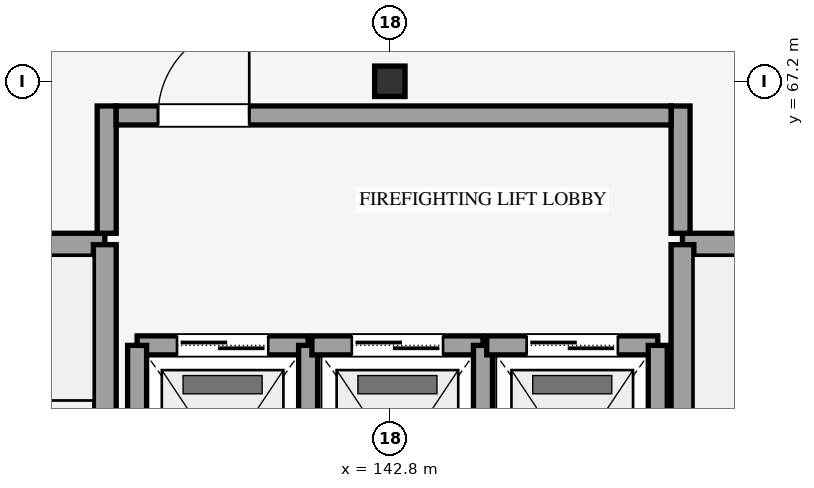
"""IFC4 building model, lengths in metres.
Left out: names, types, materials, properties, quantities, classifications, styles, units other than length and angle.
Written with IfcOpenShell. Run it as: python <this file> out.ifc"""

import sys

from ifc_helpers import new_model, si_unit, direction, frame, frame_2d, origin, origin_2d, place, context, subcontext, project, spatial, rectangle, i_section, extrude, element, fill, save


model = new_model("IFC4")
c1 = context("Model", 3, precision=1e-05, world=origin(), true_north=direction((0.0, 1.0)))
c2 = subcontext(c1, "Body", "Model", "MODEL_VIEW")
j1 = project(units=[si_unit("LENGTHUNIT", "METRE"), si_unit("PLANEANGLEUNIT", "RADIAN")], contexts=[c1])
p1 = place(None, origin())
s1 = spatial("IfcSite", under=j1, at=p1, CompositionType="ELEMENT")
p2 = place(p1, origin())
s2 = spatial("IfcBuilding", under=s1, at=p2, CompositionType="ELEMENT")
p3 = place(p2, frame((0.0, 0.0, 36.3)))
s3 = spatial("IfcBuildingStorey", under=s2, at=p3, CompositionType="ELEMENT", Elevation=36.3)
p4 = place(p3, frame((142.8, 67.2, 0.0), z_axis=(0.0, 0.0, 1.0), x_axis=(1.0, 0.0, 0.0)))
e1 = element("IfcColumn", 1, at=p4, inside=s3, PredefinedType="COLUMN", context=c2, shape_type="SweptSolid", body=[
    extrude(i_section(OverallWidth=0.4, OverallDepth=0.4, WebThickness=0.013, FlangeThickness=0.021, FilletRadius=0.022, at=origin_2d()), origin(), (0.0, 0.0, 1.0), 4.2),
])
p5 = place(p3, frame((135.05, 65.05, 0.0), z_axis=(0.0, 0.0, 1.0), x_axis=(1.0, 0.0, 0.0)))
e2 = element("IfcWall", 2, at=p5, inside=s3, PredefinedType="SHEAR", context=c2, shape_type="SweptSolid", body=[
    extrude(rectangle(XDim=4.0, YDim=0.3, at=frame_2d((2.0, 0.0))), origin(), (0.0, 0.0, 1.0), 4.2),
])
p6 = place(p3, frame((139.05, 50.75, 0.0), z_axis=(0.0, 0.0, 1.0), x_axis=(0.0, 1.0, 0.0)))
e3 = element("IfcWall", 3, at=p6, inside=s3, PredefinedType="SHEAR", context=c2, shape_type="SweptSolid", body=[
    extrude(rectangle(XDim=14.3, YDim=0.3, at=frame_2d((7.15, 0.0))), origin(), (0.0, 0.0, 1.0), 4.2),
])
p7 = place(p3, frame((146.65, 65.05, 0.0), z_axis=(0.0, 0.0, 1.0), x_axis=(1.0, 0.0, 0.0)))
e4 = element("IfcWall", 4, at=p7, inside=s3, PredefinedType="SHEAR", context=c2, shape_type="SweptSolid", body=[
    extrude(rectangle(XDim=4.0, YDim=0.3, at=frame_2d((2.0, 0.0))), origin(), (0.0, 0.0, 1.0), 4.2),
])
p8 = place(p3, frame((146.65, 50.75, 0.0), z_axis=(0.0, 0.0, 1.0), x_axis=(0.0, 1.0, 0.0)))
e5 = element("IfcWall", 5, at=p8, inside=s3, PredefinedType="SHEAR", context=c2, shape_type="SweptSolid", body=[
    extrude(rectangle(XDim=14.3, YDim=0.3, at=frame_2d((7.15, 0.0))), origin(), (0.0, 0.0, 1.0), 4.2),
])
p9 = place(p3, frame((139.475, 63.725, 0.0), z_axis=(0.0, 0.0, 1.0), x_axis=(1.0, 0.0, 0.0)))
e6 = element("IfcWall", 6, at=p9, inside=s3, PredefinedType="SHEAR", context=c2, shape_type="SweptSolid", body=[
    extrude(rectangle(XDim=2.25, YDim=0.25, at=frame_2d((1.125, 0.0))), origin(), (0.0, 0.0, 1.0), 3.96),
])
p10 = place(p9, frame((0.525, 0.0, 0.0)))
e7 = element("IfcOpeningElement", 7, at=p10, cuts=e6, PredefinedType="OPENING", context=c2, shape_type="SweptSolid", body=[
    extrude(rectangle(XDim=1.2, YDim=2.18, at=frame_2d((0.6, 1.09))), frame((0.0, 0.135, 0.0), z_axis=(0.0, -1.0, 0.0), x_axis=(1.0, 0.0, 0.0)), (0.0, 0.0, 1.0), 0.27),
])
for number, where, z_axis, x_axis in (
    (8, (139.475, 60.675, 0.0), (0.0, 0.0, 1.0), (0.0, 1.0, 0.0)),
    (9, (141.725, 60.675, 0.0), (0.0, 0.0, 1.0), (0.0, 1.0, 0.0)),
):
    element("IfcWall", number, at=place(p3, frame(where, z_axis=z_axis, x_axis=x_axis)), inside=s3, PredefinedType="SHEAR", context=c2, shape_type="SweptSolid", body=[
        extrude(rectangle(XDim=3.05, YDim=0.25, at=frame_2d((1.525, 0.0))), origin(), (0.0, 0.0, 1.0), 3.96),
    ])
p11 = place(p3, frame((141.775, 63.725, 0.0), z_axis=(0.0, 0.0, 1.0), x_axis=(1.0, 0.0, 0.0)))
e10 = element("IfcWall", 10, at=p11, inside=s3, PredefinedType="SHEAR", context=c2, shape_type="SweptSolid", body=[
    extrude(rectangle(XDim=2.25, YDim=0.25, at=frame_2d((1.125, 0.0))), origin(), (0.0, 0.0, 1.0), 3.96),
])
p12 = place(p11, frame((0.525, 0.0, 0.0)))
e11 = element("IfcOpeningElement", 11, at=p12, cuts=e10, PredefinedType="OPENING", context=c2, shape_type="SweptSolid", body=[
    extrude(rectangle(XDim=1.2, YDim=2.18, at=frame_2d((0.6, 1.09))), frame((0.0, 0.135, 0.0), z_axis=(0.0, -1.0, 0.0), x_axis=(1.0, 0.0, 0.0)), (0.0, 0.0, 1.0), 0.27),
])
p13 = place(p3, frame((144.025, 60.675, 0.0), z_axis=(0.0, 0.0, 1.0), x_axis=(0.0, 1.0, 0.0)))
e12 = element("IfcWall", 12, at=p13, inside=s3, PredefinedType="SHEAR", context=c2, shape_type="SweptSolid", body=[
    extrude(rectangle(XDim=3.05, YDim=0.25, at=frame_2d((1.525, 0.0))), origin(), (0.0, 0.0, 1.0), 3.96),
])
p14 = place(p3, frame((144.075, 63.725, 0.0), z_axis=(0.0, 0.0, 1.0), x_axis=(1.0, 0.0, 0.0)))
e13 = element("IfcWall", 13, at=p14, inside=s3, PredefinedType="SHEAR", context=c2, shape_type="SweptSolid", body=[
    extrude(rectangle(XDim=2.25, YDim=0.25, at=frame_2d((1.125, 0.0))), origin(), (0.0, 0.0, 1.0), 3.96),
])
p15 = place(p14, frame((0.525, 0.0, 0.0)))
e14 = element("IfcOpeningElement", 14, at=p15, cuts=e13, PredefinedType="OPENING", context=c2, shape_type="SweptSolid", body=[
    extrude(rectangle(XDim=1.2, YDim=2.18, at=frame_2d((0.6, 1.09))), frame((0.0, 0.135, 0.0), z_axis=(0.0, -1.0, 0.0), x_axis=(1.0, 0.0, 0.0)), (0.0, 0.0, 1.0), 0.27),
])
p16 = place(p3, frame((146.325, 60.675, 0.0), z_axis=(0.0, 0.0, 1.0), x_axis=(0.0, 1.0, 0.0)))
e15 = element("IfcWall", 15, at=p16, inside=s3, PredefinedType="SHEAR", context=c2, shape_type="SweptSolid", body=[
    extrude(rectangle(XDim=3.05, YDim=0.25, at=frame_2d((1.525, 0.0))), origin(), (0.0, 0.0, 1.0), 3.96),
])
for number, where, z_axis, x_axis in (
    (16, (139.075, 65.2, 0.0), (0.0, 0.0, 1.0), (0.0, 1.0, 0.0)),
    (17, (146.625, 65.2, 0.0), (0.0, 0.0, 1.0), (0.0, 1.0, 0.0)),
):
    element("IfcWall", number, at=place(p3, frame(where, z_axis=z_axis, x_axis=x_axis)), inside=s3, PredefinedType="SHEAR", context=c2, shape_type="SweptSolid", body=[
        extrude(rectangle(XDim=1.675, YDim=0.25, at=frame_2d((0.837, 0.0))), origin(), (0.0, 0.0, 1.0), 3.96),
    ])
p17 = place(p3, frame((139.2, 66.75, 0.0), z_axis=(0.0, 0.0, 1.0), x_axis=(1.0, 0.0, 0.0)))
e18 = element("IfcWall", 18, at=p17, inside=s3, PredefinedType="SHEAR", context=c2, shape_type="SweptSolid", body=[
    extrude(rectangle(XDim=7.3, YDim=0.25, at=frame_2d((3.65, 0.0))), origin(), (0.0, 0.0, 1.0), 3.96),
])
p18 = place(p17, frame((0.55, 0.0, 0.0)))
e19 = element("IfcOpeningElement", 19, at=p18, cuts=e18, PredefinedType="OPENING", context=c2, shape_type="SweptSolid", body=[
    extrude(rectangle(XDim=1.2, YDim=2.15, at=frame_2d((0.6, 1.075))), frame((0.0, 0.135, 0.0), z_axis=(0.0, -1.0, 0.0), x_axis=(1.0, 0.0, 0.0)), (0.0, 0.0, 1.0), 0.27),
])
p19 = place(p10, origin())
e20 = element("IfcDoor", 20, at=p19, inside=s3, OperationType="DOUBLE_DOOR_SLIDING", PredefinedType="DOOR", context=c2, shape_type="SweptSolid", body=[
    extrude(rectangle(XDim=1.2, YDim=2.18, at=frame_2d((0.6, 1.09))), frame((0.0, 0.025, 0.0), z_axis=(0.0, -1.0, 0.0), x_axis=(1.0, 0.0, 0.0)), (0.0, 0.0, 1.0), 0.05),
])
fill(e7, e20)
p20 = place(p12, origin())
e21 = element("IfcDoor", 21, at=p20, inside=s3, OperationType="DOUBLE_DOOR_SLIDING", PredefinedType="DOOR", context=c2, shape_type="SweptSolid", body=[
    extrude(rectangle(XDim=1.2, YDim=2.18, at=frame_2d((0.6, 1.09))), frame((0.0, 0.025, 0.0), z_axis=(0.0, -1.0, 0.0), x_axis=(1.0, 0.0, 0.0)), (0.0, 0.0, 1.0), 0.05),
])
fill(e11, e21)
p21 = place(p15, origin())
e22 = element("IfcDoor", 22, at=p21, inside=s3, OperationType="DOUBLE_DOOR_SLIDING", PredefinedType="DOOR", context=c2, shape_type="SweptSolid", body=[
    extrude(rectangle(XDim=1.2, YDim=2.18, at=frame_2d((0.6, 1.09))), frame((0.0, 0.025, 0.0), z_axis=(0.0, -1.0, 0.0), x_axis=(1.0, 0.0, 0.0)), (0.0, 0.0, 1.0), 0.05),
])
fill(e14, e22)
p22 = place(p18, origin())
e23 = element("IfcDoor", 23, at=p22, inside=s3, OperationType="SINGLE_SWING_RIGHT", PredefinedType="DOOR", context=c2, shape_type="SweptSolid", body=[
    extrude(rectangle(XDim=1.2, YDim=2.15, at=frame_2d((0.6, 1.075))), frame((0.0, 0.025, 0.0), z_axis=(0.0, -1.0, 0.0), x_axis=(1.0, 0.0, 0.0)), (0.0, 0.0, 1.0), 0.05),
])
fill(e19, e23)
save(model, sys.argv[1])
